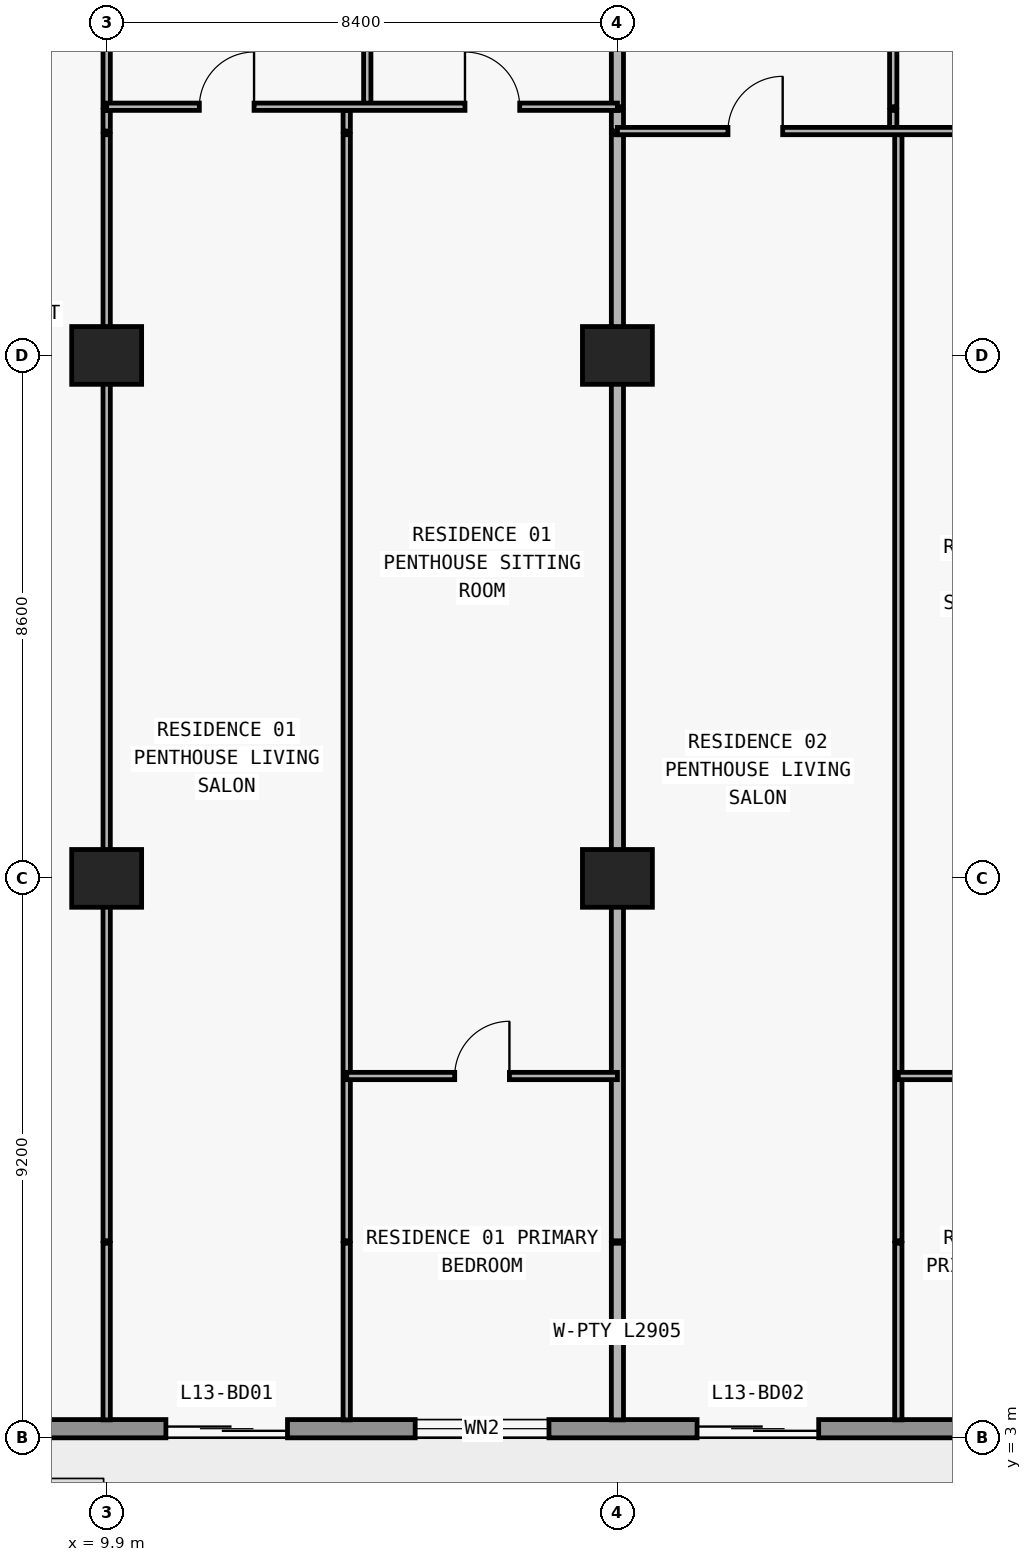
"""IFC4 building model, lengths in metres.
Left out: names, types, materials, properties, quantities, classifications, styles, units other than length and angle.
Written with IfcOpenShell. Run it as: python <this file> out.ifc"""

import sys

from ifc_helpers import new_model, si_unit, direction, frame, frame_2d, origin, origin_2d, place, context, subcontext, project, spatial, rectangle, extrude, element, fill, save


model = new_model("IFC4")
c1 = context("Model", 3, precision=1e-05, world=origin(), true_north=direction((0.0, 1.0)))
c2 = subcontext(c1, "Body", "Model", "MODEL_VIEW")
j1 = project(units=[si_unit("LENGTHUNIT", "METRE"), si_unit("PLANEANGLEUNIT", "RADIAN")], contexts=[c1])
p1 = place(None, origin())
s1 = spatial("IfcSite", under=j1, at=p1, CompositionType="ELEMENT")
p2 = place(p1, origin())
s2 = spatial("IfcBuilding", under=s1, at=p2, CompositionType="ELEMENT")
p3 = place(p2, frame((0.0, 0.0, 53.1)))
s3 = spatial("IfcBuildingStorey", under=s2, at=p3, CompositionType="ELEMENT", Elevation=53.1)
for number, where, z_axis, x_axis in (
    (1, (9.9, 12.2, 0.0), (0.0, 0.0, 1.0), (1.0, 0.0, 0.0)),
    (2, (18.3, 12.2, 0.0), (0.0, 0.0, 1.0), (1.0, 0.0, 0.0)),
    (3, (9.9, 20.8, 0.0), (0.0, 0.0, 1.0), (1.0, 0.0, 0.0)),
    (4, (18.3, 20.8, 0.0), (0.0, 0.0, 1.0), (1.0, 0.0, 0.0)),
):
    element("IfcColumn", number, at=place(p3, frame(where, z_axis=z_axis, x_axis=x_axis)), inside=s3, PredefinedType="COLUMN", context=c2, shape_type="SweptSolid", body=[
        extrude(rectangle(XDim=1.15, YDim=0.95, at=origin_2d()), origin(), (0.0, 0.0, 1.0), 3.05),
    ])
p4 = place(p3, frame((72.7, 3.15, 0.0), z_axis=(0.0, 0.0, 1.0), x_axis=(-1.0, 0.0, 0.0)))
e5 = element("IfcWall", 5, at=p4, inside=s3, PredefinedType="STANDARD", context=c2, shape_type="SweptSolid", body=[
    extrude(rectangle(XDim=67.6, YDim=0.3, at=frame_2d((33.8, 0.0))), origin(), (0.0, 0.0, 1.0), 3.05),
])
p5 = place(p4, frame((59.826, 0.0, 0.0)))
e6 = element("IfcOpeningElement", 6, at=p5, cuts=e5, PredefinedType="OPENING", context=c2, shape_type="SweptSolid", body=[
    extrude(rectangle(XDim=2.0, YDim=2.3, at=frame_2d((1.0, 1.15))), frame((0.0, 0.16, 0.0), z_axis=(0.0, -1.0, 0.0), x_axis=(1.0, 0.0, 0.0)), (0.0, 0.0, 1.0), 0.32),
])
p6 = place(p4, frame((55.526, 0.0, 0.85)))
e7 = element("IfcOpeningElement", 7, at=p6, cuts=e5, PredefinedType="OPENING", context=c2, shape_type="SweptSolid", body=[
    extrude(rectangle(XDim=2.2, YDim=1.55, at=frame_2d((1.1, 0.775))), frame((0.0, 0.16, 0.0), z_axis=(0.0, -1.0, 0.0), x_axis=(1.0, 0.0, 0.0)), (0.0, 0.0, 1.0), 0.32),
])
p7 = place(p4, frame((51.09, 0.0, 0.0)))
e8 = element("IfcOpeningElement", 8, at=p7, cuts=e5, PredefinedType="OPENING", context=c2, shape_type="SweptSolid", body=[
    extrude(rectangle(XDim=2.0, YDim=2.3, at=frame_2d((1.0, 1.15))), frame((0.0, 0.16, 0.0), z_axis=(0.0, -1.0, 0.0), x_axis=(1.0, 0.0, 0.0)), (0.0, 0.0, 1.0), 0.32),
])
p8 = place(p4, frame((46.99, 0.0, 0.85)))
e9 = element("IfcOpeningElement", 9, at=p8, cuts=e5, PredefinedType="OPENING", context=c2, shape_type="SweptSolid", body=[
    extrude(rectangle(XDim=1.8, YDim=1.55, at=frame_2d((0.9, 0.775))), frame((0.0, 0.16, 0.0), z_axis=(0.0, -1.0, 0.0), x_axis=(1.0, 0.0, 0.0)), (0.0, 0.0, 1.0), 0.32),
])
p9 = place(p4, frame((43.09, 0.0, 0.0)))
e10 = element("IfcOpeningElement", 10, at=p9, cuts=e5, PredefinedType="OPENING", context=c2, shape_type="SweptSolid", body=[
    extrude(rectangle(XDim=2.0, YDim=2.3, at=frame_2d((1.0, 1.15))), frame((0.0, 0.16, 0.0), z_axis=(0.0, -1.0, 0.0), x_axis=(1.0, 0.0, 0.0)), (0.0, 0.0, 1.0), 0.32),
])
p10 = place(p4, frame((38.41, 0.0, 0.65)))
e11 = element("IfcOpeningElement", 11, at=p10, cuts=e5, PredefinedType="OPENING", context=c2, shape_type="SweptSolid", body=[
    extrude(rectangle(XDim=2.6, YDim=1.85, at=frame_2d((1.3, 0.925))), frame((0.0, 0.16, 0.0), z_axis=(0.0, -1.0, 0.0), x_axis=(1.0, 0.0, 0.0)), (0.0, 0.0, 1.0), 0.32),
])
p11 = place(p4, frame((32.7, 0.0, 0.85)))
e12 = element("IfcOpeningElement", 12, at=p11, cuts=e5, PredefinedType="OPENING", context=c2, shape_type="SweptSolid", body=[
    extrude(rectangle(XDim=2.2, YDim=1.55, at=frame_2d((1.1, 0.775))), frame((0.0, 0.16, 0.0), z_axis=(0.0, -1.0, 0.0), x_axis=(1.0, 0.0, 0.0)), (0.0, 0.0, 1.0), 0.32),
])
p12 = place(p4, frame((24.7, 0.0, 0.85)))
e13 = element("IfcOpeningElement", 13, at=p12, cuts=e5, PredefinedType="OPENING", context=c2, shape_type="SweptSolid", body=[
    extrude(rectangle(XDim=2.2, YDim=1.55, at=frame_2d((1.1, 0.775))), frame((0.0, 0.16, 0.0), z_axis=(0.0, -1.0, 0.0), x_axis=(1.0, 0.0, 0.0)), (0.0, 0.0, 1.0), 0.32),
])
p13 = place(p4, frame((18.29, 0.0, 0.0)))
e14 = element("IfcOpeningElement", 14, at=p13, cuts=e5, PredefinedType="OPENING", context=c2, shape_type="SweptSolid", body=[
    extrude(rectangle(XDim=2.0, YDim=2.3, at=frame_2d((1.0, 1.15))), frame((0.0, 0.16, 0.0), z_axis=(0.0, -1.0, 0.0), x_axis=(1.0, 0.0, 0.0)), (0.0, 0.0, 1.0), 0.32),
])
p14 = place(p4, frame((14.19, 0.0, 0.85)))
e15 = element("IfcOpeningElement", 15, at=p14, cuts=e5, PredefinedType="OPENING", context=c2, shape_type="SweptSolid", body=[
    extrude(rectangle(XDim=1.8, YDim=1.55, at=frame_2d((0.9, 0.775))), frame((0.0, 0.16, 0.0), z_axis=(0.0, -1.0, 0.0), x_axis=(1.0, 0.0, 0.0)), (0.0, 0.0, 1.0), 0.32),
])
p15 = place(p4, frame((10.226, 0.0, 0.0)))
e16 = element("IfcOpeningElement", 16, at=p15, cuts=e5, PredefinedType="OPENING", context=c2, shape_type="SweptSolid", body=[
    extrude(rectangle(XDim=2.0, YDim=2.3, at=frame_2d((1.0, 1.15))), frame((0.0, 0.16, 0.0), z_axis=(0.0, -1.0, 0.0), x_axis=(1.0, 0.0, 0.0)), (0.0, 0.0, 1.0), 0.32),
])
p16 = place(p4, frame((5.926, 0.0, 0.85)))
e17 = element("IfcOpeningElement", 17, at=p16, cuts=e5, PredefinedType="OPENING", context=c2, shape_type="SweptSolid", body=[
    extrude(rectangle(XDim=2.2, YDim=1.55, at=frame_2d((1.1, 0.775))), frame((0.0, 0.16, 0.0), z_axis=(0.0, -1.0, 0.0), x_axis=(1.0, 0.0, 0.0)), (0.0, 0.0, 1.0), 0.32),
])
p17 = place(p3, frame((9.9, 3.295, 0.0), z_axis=(0.0, 0.0, 1.0), x_axis=(0.0, 1.0, 0.0)))
e18 = element("IfcWall", 18, at=p17, inside=s3, PredefinedType="PARTITIONING", context=c2, shape_type="SweptSolid", body=[
    extrude(rectangle(XDim=2.905, YDim=0.12, at=frame_2d((1.453, 0.0))), origin(), (0.0, 0.0, 1.0), 3.05),
])
p18 = place(p3, frame((9.9, 6.24, 0.0), z_axis=(0.0, 0.0, 1.0), x_axis=(0.0, 1.0, 0.0)))
e19 = element("IfcWall", 19, at=p18, inside=s3, PredefinedType="PARTITIONING", context=c2, shape_type="SweptSolid", body=[
    extrude(rectangle(XDim=18.19, YDim=0.12, at=frame_2d((9.095, 0.0))), origin(), (0.0, 0.0, 1.0), 2.11),
])
p19 = place(p3, frame((9.9, 24.49, 0.0), z_axis=(0.0, 0.0, 1.0), x_axis=(0.0, 1.0, 0.0)))
e20 = element("IfcWall", 20, at=p19, inside=s3, PredefinedType="PARTITIONING", context=c2, shape_type="SweptSolid", body=[
    extrude(rectangle(XDim=0.34, YDim=0.12, at=frame_2d((0.17, 0.0))), origin(), (0.0, 0.0, 1.0), 2.11),
])
p20 = place(p3, frame((9.9, 24.89, 0.0), z_axis=(0.0, 0.0, 1.0), x_axis=(0.0, 1.0, 0.0)))
e21 = element("IfcWall", 21, at=p20, inside=s3, PredefinedType="PARTITIONING", context=c2, shape_type="SweptSolid", body=[
    extrude(rectangle(XDim=4.69, YDim=0.12, at=frame_2d((2.345, 0.0))), origin(), (0.0, 0.0, 1.0), 2.11),
])
p21 = place(p20, frame((1.895, 0.0, 0.0)))
e22 = element("IfcOpeningElement", 22, at=p21, cuts=e21, PredefinedType="OPENING", context=c2, shape_type="SweptSolid", body=[
    extrude(rectangle(XDim=0.9, YDim=2.06, at=frame_2d((0.45, 1.03))), frame((0.0, 0.07, 0.0), z_axis=(0.0, -1.0, 0.0), x_axis=(1.0, 0.0, 0.0)), (0.0, 0.0, 1.0), 0.14),
])
p22 = place(p3, frame((13.848, 3.295, 0.0), z_axis=(0.0, 0.0, 1.0), x_axis=(0.0, 1.0, 0.0)))
e23 = element("IfcWall", 23, at=p22, inside=s3, PredefinedType="PARTITIONING", context=c2, shape_type="SweptSolid", body=[
    extrude(rectangle(XDim=2.905, YDim=0.12, at=frame_2d((1.453, 0.0))), origin(), (0.0, 0.0, 1.0), 3.05),
])
p23 = place(p3, frame((13.848, 6.24, 0.0), z_axis=(0.0, 0.0, 1.0), x_axis=(0.0, 1.0, 0.0)))
e24 = element("IfcWall", 24, at=p23, inside=s3, PredefinedType="PARTITIONING", context=c2, shape_type="SweptSolid", body=[
    extrude(rectangle(XDim=18.19, YDim=0.12, at=frame_2d((9.095, 0.0))), origin(), (0.0, 0.0, 1.0), 2.423),
])
p24 = place(p3, frame((13.848, 24.49, 0.0), z_axis=(0.0, 0.0, 1.0), x_axis=(0.0, 1.0, 0.0)))
e25 = element("IfcWall", 25, at=p24, inside=s3, PredefinedType="PARTITIONING", context=c2, shape_type="SweptSolid", body=[
    extrude(rectangle(XDim=0.34, YDim=0.12, at=frame_2d((0.17, 0.0))), origin(), (0.0, 0.0, 1.0), 2.423),
])
p25 = place(p3, frame((14.186, 24.89, 0.0), z_axis=(0.0, 0.0, 1.0), x_axis=(0.0, 1.0, 0.0)))
e26 = element("IfcWall", 26, at=p25, inside=s3, PredefinedType="PARTITIONING", context=c2, shape_type="SweptSolid", body=[
    extrude(rectangle(XDim=4.69, YDim=0.12, at=frame_2d((2.345, 0.0))), origin(), (0.0, 0.0, 1.0), 2.423),
])
p26 = place(p25, frame((1.895, 0.0, 0.0)))
e27 = element("IfcOpeningElement", 27, at=p26, cuts=e26, PredefinedType="OPENING", context=c2, shape_type="SweptSolid", body=[
    extrude(rectangle(XDim=0.9, YDim=2.15, at=frame_2d((0.45, 1.075))), frame((0.0, 0.07, 0.0), z_axis=(0.0, -1.0, 0.0), x_axis=(1.0, 0.0, 0.0)), (0.0, 0.0, 1.0), 0.14),
])
p27 = place(p3, frame((18.3, 3.295, 0.0), z_axis=(0.0, 0.0, 1.0), x_axis=(0.0, 1.0, 0.0)))
e28 = element("IfcWall", 28, at=p27, inside=s3, PredefinedType="PARTITIONING", context=c2, shape_type="SweptSolid", body=[
    extrude(rectangle(XDim=2.905, YDim=0.2, at=frame_2d((1.453, 0.0))), origin(), (0.0, 0.0, 1.0), 3.05),
])
p28 = place(p3, frame((18.3, 6.24, 0.0), z_axis=(0.0, 0.0, 1.0), x_axis=(0.0, 1.0, 0.0)))
e29 = element("IfcWall", 29, at=p28, inside=s3, PredefinedType="PARTITIONING", context=c2, shape_type="SweptSolid", body=[
    extrude(rectangle(XDim=18.19, YDim=0.2, at=frame_2d((9.095, 0.0))), origin(), (0.0, 0.0, 1.0), 2.11),
])
p29 = place(p3, frame((18.3, 24.49, 0.0), z_axis=(0.0, 0.0, 1.0), x_axis=(0.0, 1.0, 0.0)))
e30 = element("IfcWall", 30, at=p29, inside=s3, PredefinedType="PARTITIONING", context=c2, shape_type="SweptSolid", body=[
    extrude(rectangle(XDim=0.34, YDim=0.2, at=frame_2d((0.17, 0.0))), origin(), (0.0, 0.0, 1.0), 2.11),
])
p30 = place(p3, frame((18.3, 24.89, 0.0), z_axis=(0.0, 0.0, 1.0), x_axis=(0.0, 1.0, 0.0)))
e31 = element("IfcWall", 31, at=p30, inside=s3, PredefinedType="PARTITIONING", context=c2, shape_type="SweptSolid", body=[
    extrude(rectangle(XDim=4.69, YDim=0.2, at=frame_2d((2.345, 0.0))), origin(), (0.0, 0.0, 1.0), 2.11),
])
p31 = place(p3, frame((22.836, 24.49, 0.0), z_axis=(0.0, 0.0, 1.0), x_axis=(0.0, 1.0, 0.0)))
e32 = element("IfcWall", 32, at=p31, inside=s3, PredefinedType="PARTITIONING", context=c2, shape_type="SweptSolid", body=[
    extrude(rectangle(XDim=0.34, YDim=0.12, at=frame_2d((0.17, 0.0))), origin(), (0.0, 0.0, 1.0), 3.05),
])
p32 = place(p3, frame((22.836, 24.89, 0.0), z_axis=(0.0, 0.0, 1.0), x_axis=(0.0, 1.0, 0.0)))
e33 = element("IfcWall", 33, at=p32, inside=s3, PredefinedType="PARTITIONING", context=c2, shape_type="SweptSolid", body=[
    extrude(rectangle(XDim=4.69, YDim=0.12, at=frame_2d((2.345, 0.0))), origin(), (0.0, 0.0, 1.0), 3.05),
])
p33 = place(p32, frame((1.895, 0.0, 0.0)))
e34 = element("IfcOpeningElement", 34, at=p33, cuts=e33, PredefinedType="OPENING", context=c2, shape_type="SweptSolid", body=[
    extrude(rectangle(XDim=0.9, YDim=2.15, at=frame_2d((0.45, 1.075))), frame((0.0, 0.07, 0.0), z_axis=(0.0, -1.0, 0.0), x_axis=(1.0, 0.0, 0.0)), (0.0, 0.0, 1.0), 0.14),
])
p34 = place(p3, frame((22.92, 3.295, 0.0), z_axis=(0.0, 0.0, 1.0), x_axis=(0.0, 1.0, 0.0)))
e35 = element("IfcWall", 35, at=p34, inside=s3, PredefinedType="PARTITIONING", context=c2, shape_type="SweptSolid", body=[
    extrude(rectangle(XDim=2.905, YDim=0.12, at=frame_2d((1.453, 0.0))), origin(), (0.0, 0.0, 1.0), 3.05),
])
p35 = place(p3, frame((22.92, 6.24, 0.0), z_axis=(0.0, 0.0, 1.0), x_axis=(0.0, 1.0, 0.0)))
e36 = element("IfcWall", 36, at=p35, inside=s3, PredefinedType="PARTITIONING", context=c2, shape_type="SweptSolid", body=[
    extrude(rectangle(XDim=18.19, YDim=0.12, at=frame_2d((9.095, 0.0))), origin(), (0.0, 0.0, 1.0), 3.05),
])
p36 = place(p3, frame((13.848, 8.95, 0.0), z_axis=(0.0, 0.0, 1.0), x_axis=(1.0, 0.0, 0.0)))
e37 = element("IfcWall", 37, at=p36, inside=s3, PredefinedType="PARTITIONING", context=c2, shape_type="SweptSolid", body=[
    extrude(rectangle(XDim=4.452, YDim=0.12, at=frame_2d((2.226, 0.0))), origin(), (0.0, 0.0, 1.0), 3.05),
])
p37 = place(p36, frame((1.776, 0.0, 0.0)))
e38 = element("IfcOpeningElement", 38, at=p37, cuts=e37, PredefinedType="OPENING", context=c2, shape_type="SweptSolid", body=[
    extrude(rectangle(XDim=0.9, YDim=2.15, at=frame_2d((0.45, 1.075))), frame((0.0, 0.07, 0.0), z_axis=(0.0, -1.0, 0.0), x_axis=(1.0, 0.0, 0.0)), (0.0, 0.0, 1.0), 0.14),
])
p38 = place(p3, frame((22.92, 8.95, 0.0), z_axis=(0.0, 0.0, 1.0), x_axis=(1.0, 0.0, 0.0)))
e39 = element("IfcWall", 39, at=p38, inside=s3, PredefinedType="PARTITIONING", context=c2, shape_type="SweptSolid", body=[
    extrude(rectangle(XDim=3.78, YDim=0.12, at=frame_2d((1.89, 0.0))), origin(), (0.0, 0.0, 1.0), 3.05),
])
p39 = place(p38, frame((1.44, 0.0, 0.0)))
e40 = element("IfcOpeningElement", 40, at=p39, cuts=e39, PredefinedType="OPENING", context=c2, shape_type="SweptSolid", body=[
    extrude(rectangle(XDim=0.9, YDim=2.15, at=frame_2d((0.45, 1.075))), frame((0.0, 0.07, 0.0), z_axis=(0.0, -1.0, 0.0), x_axis=(1.0, 0.0, 0.0)), (0.0, 0.0, 1.0), 0.14),
])
p40 = place(p3, frame((18.3, 24.49, 0.0), z_axis=(0.0, 0.0, 1.0), x_axis=(1.0, 0.0, 0.0)))
e41 = element("IfcWall", 41, at=p40, inside=s3, PredefinedType="PARTITIONING", context=c2, shape_type="SweptSolid", body=[
    extrude(rectangle(XDim=8.13, YDim=0.12, at=frame_2d((4.065, 0.0))), origin(), (0.0, 0.0, 1.0), 3.05),
])
p41 = place(p40, frame((1.818, 0.0, 0.0)))
e42 = element("IfcOpeningElement", 42, at=p41, cuts=e41, PredefinedType="OPENING", context=c2, shape_type="SweptSolid", body=[
    extrude(rectangle(XDim=0.9, YDim=2.15, at=frame_2d((0.45, 1.075))), frame((0.0, 0.07, 0.0), z_axis=(0.0, -1.0, 0.0), x_axis=(1.0, 0.0, 0.0)), (0.0, 0.0, 1.0), 0.14),
])
p42 = place(p40, frame((5.925, 0.0, 0.0)))
e43 = element("IfcOpeningElement", 43, at=p42, cuts=e41, PredefinedType="OPENING", context=c2, shape_type="SweptSolid", body=[
    extrude(rectangle(XDim=0.9, YDim=2.15, at=frame_2d((0.45, 1.075))), frame((0.0, 0.07, 0.0), z_axis=(0.0, -1.0, 0.0), x_axis=(1.0, 0.0, 0.0)), (0.0, 0.0, 1.0), 0.14),
])
p43 = place(p3, frame((9.9, 24.89, 0.0), z_axis=(0.0, 0.0, 1.0), x_axis=(1.0, 0.0, 0.0)))
e44 = element("IfcWall", 44, at=p43, inside=s3, PredefinedType="PARTITIONING", context=c2, shape_type="SweptSolid", body=[
    extrude(rectangle(XDim=8.4, YDim=0.12, at=frame_2d((4.2, 0.0))), origin(), (0.0, 0.0, 1.0), 3.05),
])
p44 = place(p43, frame((1.524, 0.0, 0.0)))
e45 = element("IfcOpeningElement", 45, at=p44, cuts=e44, PredefinedType="OPENING", context=c2, shape_type="SweptSolid", body=[
    extrude(rectangle(XDim=0.9, YDim=2.15, at=frame_2d((0.45, 1.075))), frame((0.0, 0.07, 0.0), z_axis=(0.0, -1.0, 0.0), x_axis=(1.0, 0.0, 0.0)), (0.0, 0.0, 1.0), 0.14),
])
p45 = place(p43, frame((5.893, 0.0, 0.0)))
e46 = element("IfcOpeningElement", 46, at=p45, cuts=e44, PredefinedType="OPENING", context=c2, shape_type="SweptSolid", body=[
    extrude(rectangle(XDim=0.9, YDim=2.15, at=frame_2d((0.45, 1.075))), frame((0.0, 0.07, 0.0), z_axis=(0.0, -1.0, 0.0), x_axis=(1.0, 0.0, 0.0)), (0.0, 0.0, 1.0), 0.14),
])
p46 = place(p5, origin())
e47 = element("IfcDoor", 47, at=p46, inside=s3, OperationType="DOUBLE_DOOR_SLIDING", PredefinedType="DOOR", context=c2, shape_type="SweptSolid", body=[
    extrude(rectangle(XDim=2.0, YDim=2.3, at=frame_2d((1.0, 1.15))), frame((0.0, 0.025, 0.0), z_axis=(0.0, -1.0, 0.0), x_axis=(1.0, 0.0, 0.0)), (0.0, 0.0, 1.0), 0.05),
])
fill(e6, e47)
p47 = place(p6, origin())
e48 = element("IfcWindow", 48, at=p47, inside=s3, PartitioningType="SINGLE_PANEL", PredefinedType="WINDOW", context=c2, shape_type="SweptSolid", body=[
    extrude(rectangle(XDim=2.2, YDim=1.55, at=frame_2d((1.1, 0.775))), frame((0.0, 0.03, 0.0), z_axis=(0.0, -1.0, 0.0), x_axis=(1.0, 0.0, 0.0)), (0.0, 0.0, 1.0), 0.06),
])
fill(e7, e48)
p48 = place(p7, origin())
e49 = element("IfcDoor", 49, at=p48, inside=s3, OperationType="DOUBLE_DOOR_SLIDING", PredefinedType="DOOR", context=c2, shape_type="SweptSolid", body=[
    extrude(rectangle(XDim=2.0, YDim=2.3, at=frame_2d((1.0, 1.15))), frame((0.0, 0.025, 0.0), z_axis=(0.0, -1.0, 0.0), x_axis=(1.0, 0.0, 0.0)), (0.0, 0.0, 1.0), 0.05),
])
fill(e8, e49)
p49 = place(p44, origin())
e50 = element("IfcDoor", 50, at=p49, inside=s3, OperationType="SINGLE_SWING_RIGHT", PredefinedType="DOOR", context=c2, shape_type="SweptSolid", body=[
    extrude(rectangle(XDim=0.9, YDim=2.15, at=frame_2d((0.45, 1.075))), frame((0.0, 0.025, 0.0), z_axis=(0.0, -1.0, 0.0), x_axis=(1.0, 0.0, 0.0)), (0.0, 0.0, 1.0), 0.05),
])
fill(e45, e50)
p50 = place(p45, origin())
e51 = element("IfcDoor", 51, at=p50, inside=s3, OperationType="SINGLE_SWING_LEFT", PredefinedType="DOOR", context=c2, shape_type="SweptSolid", body=[
    extrude(rectangle(XDim=0.9, YDim=2.15, at=frame_2d((0.45, 1.075))), frame((0.0, 0.025, 0.0), z_axis=(0.0, -1.0, 0.0), x_axis=(1.0, 0.0, 0.0)), (0.0, 0.0, 1.0), 0.05),
])
fill(e46, e51)
p51 = place(p37, origin())
e52 = element("IfcDoor", 52, at=p51, inside=s3, OperationType="SINGLE_SWING_RIGHT", PredefinedType="DOOR", context=c2, shape_type="SweptSolid", body=[
    extrude(rectangle(XDim=0.9, YDim=2.15, at=frame_2d((0.45, 1.075))), frame((0.0, 0.025, 0.0), z_axis=(0.0, -1.0, 0.0), x_axis=(1.0, 0.0, 0.0)), (0.0, 0.0, 1.0), 0.05),
])
fill(e38, e52)
p52 = place(p41, origin())
e53 = element("IfcDoor", 53, at=p52, inside=s3, OperationType="SINGLE_SWING_RIGHT", PredefinedType="DOOR", context=c2, shape_type="SweptSolid", body=[
    extrude(rectangle(XDim=0.9, YDim=2.15, at=frame_2d((0.45, 1.075))), frame((0.0, 0.025, 0.0), z_axis=(0.0, -1.0, 0.0), x_axis=(1.0, 0.0, 0.0)), (0.0, 0.0, 1.0), 0.05),
])
fill(e42, e53)
save(model, sys.argv[1])
